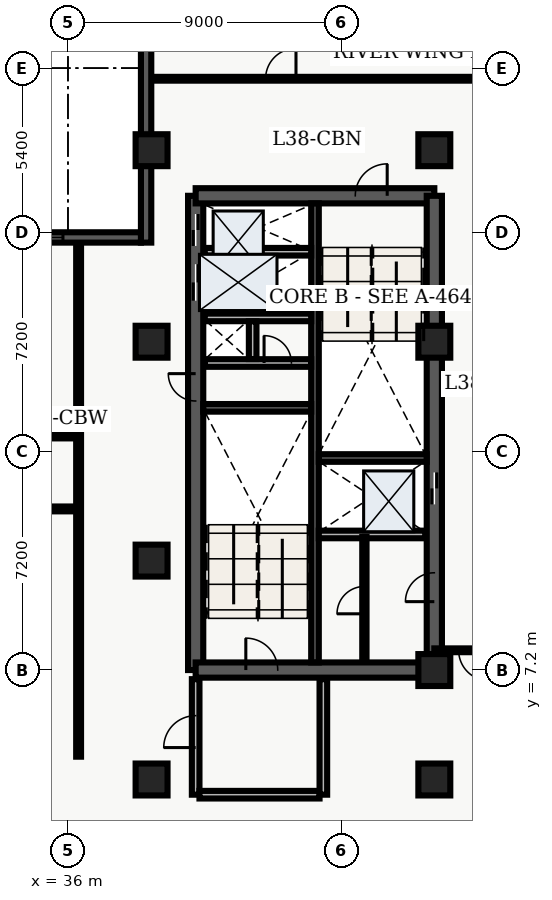
"""IFC4 building model, lengths in metres.
Left out: names, types, materials, properties, quantities, classifications, styles, units other than length and angle.
Written with IfcOpenShell. Run it as: python <this file> out.ifc"""

import sys

from ifc_helpers import new_model, entity, si_unit, converted_unit, direction, frame, origin_with_axes, origin_2d_with_axis, place, context, subcontext, project, spatial, polyline, rectangle, outline, extrude, element, fill, save


model = new_model("IFC4")
c1 = context("Model", 3, precision=1e-05, world=origin_with_axes(), true_north=direction((0.0, 1.0)))
c2 = subcontext(c1, "Body", "Model", "MODEL_VIEW")
j1 = project(units=[si_unit("LENGTHUNIT", "METRE"), converted_unit("PLANEANGLEUNIT", "DEGREE", entity("IfcPlaneAngleMeasure", 0.017), si_unit("PLANEANGLEUNIT", "RADIAN"), dimensions=[0, 0, 0, 0, 0, 0, 0])], contexts=[c1])
p1 = place(None, origin_with_axes())
s1 = spatial("IfcSite", under=j1, at=p1, CompositionType="ELEMENT")
p2 = place(p1, origin_with_axes())
s2 = spatial("IfcBuilding", under=s1, at=p2, CompositionType="ELEMENT")
p3 = place(p2, frame((0.0, 0.0, 156.3), z_axis=(0.0, 0.0, 1.0), x_axis=(1.0, 0.0, 0.0)))
s3 = spatial("IfcBuildingStorey", under=s2, at=p3, CompositionType="ELEMENT", Elevation=156.3)
p4 = place(p3, frame((40.2, 7.2, 0.0), z_axis=(0.0, 0.0, 1.0), x_axis=(0.0, 1.0, 0.0)))
e1 = element("IfcWall", 1, at=p4, inside=s3, PredefinedType="SHEAR", context=c2, shape_type="SweptSolid", body=[
    extrude(outline(polyline([(0.0, -0.25), (15.6, -0.25), (15.6, 0.25), (0.0, 0.25), (0.0, -0.25)])), origin_with_axes(), (0.0, 0.0, 1.0), 3.66),
])
p5 = place(p4, frame((14.475, 0.0, 0.0), z_axis=(0.0, 0.0, 1.0), x_axis=(1.0, 0.0, 0.0)))
e2 = element("IfcOpeningElement", 2, at=p5, cuts=e1, PredefinedType="OPENING", context=c2, shape_type="SweptSolid", body=[
    extrude(rectangle(XDim=1.05, YDim=0.52, at=origin_2d_with_axis()), origin_with_axes(), (0.0, 0.0, 1.0), 2.15),
])
p6 = place(p4, frame((12.75, 0.0, 0.0), z_axis=(0.0, 0.0, 1.0), x_axis=(1.0, 0.0, 0.0)))
e3 = element("IfcOpeningElement", 3, at=p6, cuts=e1, PredefinedType="OPENING", context=c2, shape_type="SweptSolid", body=[
    extrude(rectangle(XDim=1.2, YDim=0.52, at=origin_2d_with_axis()), origin_with_axes(), (0.0, 0.0, 1.0), 2.15),
])
p7 = place(p4, frame((9.3, 0.0, 0.0), z_axis=(0.0, 0.0, 1.0), x_axis=(1.0, 0.0, 0.0)))
e4 = element("IfcOpeningElement", 4, at=p7, cuts=e1, PredefinedType="OPENING", context=c2, shape_type="SweptSolid", body=[
    extrude(rectangle(XDim=0.9, YDim=0.52, at=origin_2d_with_axis()), origin_with_axes(), (0.0, 0.0, 1.0), 2.15),
])
p8 = place(p3, frame((40.2, 7.2, 0.0), z_axis=(0.0, 0.0, 1.0), x_axis=(1.0, 0.0, 0.0)))
e5 = element("IfcWall", 5, at=p8, inside=s3, PredefinedType="SHEAR", context=c2, shape_type="SweptSolid", body=[
    extrude(outline(polyline([(0.0, -0.25), (7.85, -0.25), (7.85, 0.25), (0.0, 0.25), (0.0, -0.25)])), origin_with_axes(), (0.0, 0.0, 1.0), 3.66),
])
p9 = place(p8, frame((2.175, 0.0, 0.0), z_axis=(0.0, 0.0, 1.0), x_axis=(1.0, 0.0, 0.0)))
e6 = element("IfcOpeningElement", 6, at=p9, cuts=e5, PredefinedType="OPENING", context=c2, shape_type="SweptSolid", body=[
    extrude(rectangle(XDim=1.05, YDim=0.52, at=origin_2d_with_axis()), origin_with_axes(), (0.0, 0.0, 1.0), 2.15),
])
p10 = place(p3, frame((40.2, 22.8, 0.0), z_axis=(0.0, 0.0, 1.0), x_axis=(1.0, 0.0, 0.0)))
e7 = element("IfcWall", 7, at=p10, inside=s3, PredefinedType="SHEAR", context=c2, shape_type="SweptSolid", body=[
    extrude(outline(polyline([(0.0, -0.25), (7.85, -0.25), (7.85, 0.25), (0.0, 0.25), (0.0, -0.25)])), origin_with_axes(), (0.0, 0.0, 1.0), 3.66),
])
p11 = place(p10, frame((5.775, 0.0, 0.0), z_axis=(0.0, 0.0, 1.0), x_axis=(1.0, 0.0, 0.0)))
e8 = element("IfcOpeningElement", 8, at=p11, cuts=e7, PredefinedType="OPENING", context=c2, shape_type="SweptSolid", body=[
    extrude(rectangle(XDim=1.05, YDim=0.52, at=origin_2d_with_axis()), origin_with_axes(), (0.0, 0.0, 1.0), 2.15),
])
p12 = place(p3, frame((48.05, 7.2, 0.0), z_axis=(0.0, 0.0, 1.0), x_axis=(0.0, 1.0, 0.0)))
e9 = element("IfcWall", 9, at=p12, inside=s3, PredefinedType="SHEAR", context=c2, shape_type="SweptSolid", body=[
    extrude(outline(polyline([(0.0, -0.25), (15.6, -0.25), (15.6, 0.25), (0.0, 0.25), (0.0, -0.25)])), origin_with_axes(), (0.0, 0.0, 1.0), 3.66),
])
p13 = place(p12, frame((5.975, 0.0, 0.0), z_axis=(0.0, 0.0, 1.0), x_axis=(1.0, 0.0, 0.0)))
e10 = element("IfcOpeningElement", 10, at=p13, cuts=e9, PredefinedType="OPENING", context=c2, shape_type="SweptSolid", body=[
    extrude(rectangle(XDim=1.05, YDim=0.52, at=origin_2d_with_axis()), origin_with_axes(), (0.0, 0.0, 1.0), 2.15),
])
p14 = place(p12, frame((2.725, 0.0, 0.0), z_axis=(0.0, 0.0, 1.0), x_axis=(1.0, 0.0, 0.0)))
e11 = element("IfcOpeningElement", 11, at=p14, cuts=e9, PredefinedType="OPENING", context=c2, shape_type="SweptSolid", body=[
    extrude(rectangle(XDim=0.95, YDim=0.52, at=origin_2d_with_axis()), origin_with_axes(), (0.0, 0.0, 1.0), 2.15),
])
p15 = place(p3, frame((44.125, 7.45, 0.0), z_axis=(0.0, 0.0, 1.0), x_axis=(0.0, 1.0, 0.0)))
e12 = element("IfcWall", 12, at=p15, inside=s3, PredefinedType="SHEAR", context=c2, shape_type="SweptSolid", body=[
    extrude(outline(polyline([(0.0, -0.125), (15.1, -0.125), (15.1, 0.125), (0.0, 0.125), (0.0, -0.125)])), origin_with_axes(), (0.0, 0.0, 1.0), 3.66),
])
for number, where, z_axis, x_axis in (
    (13, (40.45, 15.825, 0.0), (0.0, 0.0, 1.0), (1.0, 0.0, 0.0)),
    (14, (44.25, 14.175, 0.0), (0.0, 0.0, 1.0), (1.0, 0.0, 0.0)),
):
    element("IfcWall", number, at=place(p3, frame(where, z_axis=z_axis, x_axis=x_axis)), inside=s3, PredefinedType="SHEAR", context=c2, shape_type="SweptSolid", body=[
        extrude(outline(polyline([(0.0, -0.125), (3.55, -0.125), (3.55, 0.125), (0.0, 0.125), (0.0, -0.125)])), origin_with_axes(), (0.0, 0.0, 1.0), 3.66),
    ])
p16 = place(p3, frame((40.5, 17.3, 0.0), z_axis=(0.0, 0.0, 1.0), x_axis=(1.0, 0.0, 0.0)))
e15 = element("IfcWall", 15, at=p16, inside=s3, PredefinedType="SOLIDWALL", context=c2, shape_type="SweptSolid", body=[
    extrude(outline(polyline([(0.0, -0.125), (3.5, -0.125), (3.5, 0.125), (0.0, 0.125), (0.0, -0.125)])), origin_with_axes(), (0.0, 0.0, 1.0), 2.7),
])
p17 = place(p16, frame((2.4, 0.0, 0.0), z_axis=(0.0, 0.0, 1.0), x_axis=(1.0, 0.0, 0.0)))
e16 = element("IfcOpeningElement", 16, at=p17, cuts=e15, PredefinedType="OPENING", context=c2, shape_type="SweptSolid", body=[
    extrude(rectangle(XDim=0.9, YDim=0.27, at=origin_2d_with_axis()), origin_with_axes(), (0.0, 0.0, 1.0), 2.15),
])
p18 = place(p3, frame((40.5, 18.8, 0.0), z_axis=(0.0, 0.0, 1.0), x_axis=(1.0, 0.0, 0.0)))
e17 = element("IfcWall", 17, at=p18, inside=s3, PredefinedType="SOLIDWALL", context=c2, shape_type="SweptSolid", body=[
    extrude(outline(polyline([(0.0, -0.125), (3.5, -0.125), (3.5, 0.125), (0.0, 0.125), (0.0, -0.125)])), origin_with_axes(), (0.0, 0.0, 1.0), 2.7),
])
p19 = place(p3, frame((42.075, 17.43, 0.0), z_axis=(0.0, 0.0, 1.0), x_axis=(0.0, 1.0, 0.0)))
e18 = element("IfcWall", 18, at=p19, inside=s3, PredefinedType="SOLIDWALL", context=c2, shape_type="SweptSolid", body=[
    extrude(outline(polyline([(0.0, -0.125), (1.24, -0.125), (1.24, 0.125), (0.0, 0.125), (0.0, -0.125)])), origin_with_axes(), (0.0, 0.0, 1.0), 2.7),
])
p20 = place(p3, frame((40.2, 3.1, 0.0), z_axis=(0.0, 0.0, 1.0), x_axis=(0.0, 1.0, 0.0)))
e19 = element("IfcWall", 19, at=p20, inside=s3, PredefinedType="SOLIDWALL", context=c2, shape_type="SweptSolid", body=[
    extrude(outline(polyline([(0.0, -0.125), (3.8, -0.125), (3.8, 0.125), (0.0, 0.125), (0.0, -0.125)])), origin_with_axes(), (0.0, 0.0, 1.0), 2.7),
])
p21 = place(p20, frame((2.075, 0.0, 0.0), z_axis=(0.0, 0.0, 1.0), x_axis=(1.0, 0.0, 0.0)))
e20 = element("IfcOpeningElement", 20, at=p21, cuts=e19, PredefinedType="OPENING", context=c2, shape_type="SweptSolid", body=[
    extrude(rectangle(XDim=1.05, YDim=0.27, at=origin_2d_with_axis()), origin_with_axes(), (0.0, 0.0, 1.0), 2.15),
])
p22 = place(p3, frame((40.325, 3.1, 0.0), z_axis=(0.0, 0.0, 1.0), x_axis=(1.0, 0.0, 0.0)))
e21 = element("IfcWall", 21, at=p22, inside=s3, PredefinedType="SOLIDWALL", context=c2, shape_type="SweptSolid", body=[
    extrude(outline(polyline([(0.0, -0.125), (3.95, -0.125), (3.95, 0.125), (0.0, 0.125), (0.0, -0.125)])), origin_with_axes(), (0.0, 0.0, 1.0), 2.7),
])
p23 = place(p3, frame((44.4, 3.1, 0.0), z_axis=(0.0, 0.0, 1.0), x_axis=(0.0, 1.0, 0.0)))
e22 = element("IfcWall", 22, at=p23, inside=s3, PredefinedType="SOLIDWALL", context=c2, shape_type="SweptSolid", body=[
    extrude(outline(polyline([(0.0, -0.125), (3.8, -0.125), (3.8, 0.125), (0.0, 0.125), (0.0, -0.125)])), origin_with_axes(), (0.0, 0.0, 1.0), 2.7),
])
for number, where, z_axis, x_axis in (
    (23, (38.75, 3.6, 0.0), (0.0, 0.0, 1.0), (1.0, 0.0, 0.0)),
    (24, (38.75, 10.8, 0.0), (0.0, 0.0, 1.0), (1.0, 0.0, 0.0)),
    (25, (38.75, 18.0, 0.0), (0.0, 0.0, 1.0), (1.0, 0.0, 0.0)),
    (26, (38.75, 24.3, 0.0), (0.0, 0.0, 1.0), (1.0, 0.0, 0.0)),
    (27, (48.05, 3.6, 0.0), (0.0, 0.0, 1.0), (1.0, 0.0, 0.0)),
    (28, (48.05, 7.2, 0.0), (0.0, 0.0, 1.0), (1.0, 0.0, 0.0)),
    (29, (48.05, 18.0, 0.0), (0.0, 0.0, 1.0), (1.0, 0.0, 0.0)),
    (30, (48.05, 24.3, 0.0), (0.0, 0.0, 1.0), (1.0, 0.0, 0.0)),
):
    element("IfcColumn", number, at=place(p3, frame(where, z_axis=z_axis, x_axis=x_axis)), inside=s3, PredefinedType="COLUMN", context=c2, shape_type="SweptSolid", body=[
        extrude(rectangle(XDim=1.05, YDim=1.05, at=origin_2d_with_axis()), origin_with_axes(), (0.0, 0.0, 1.0), 3.9),
    ])
for number, where, z_axis, x_axis in (
    (31, (40.5, 20.96, 0.0), (0.0, 0.0, 1.0), (1.0, 0.0, 0.0)),
    (32, (44.25, 11.66, 0.0), (0.0, 0.0, 1.0), (1.0, 0.0, 0.0)),
):
    element("IfcWall", number, at=place(p3, frame(where, z_axis=z_axis, x_axis=x_axis)), inside=s3, PredefinedType="SOLIDWALL", context=c2, shape_type="SweptSolid", body=[
        extrude(outline(polyline([(0.0, -0.125), (3.5, -0.125), (3.5, 0.125), (0.0, 0.125), (0.0, -0.125)])), origin_with_axes(), (0.0, 0.0, 1.0), 2.7),
    ])
p24 = place(p3, frame((45.75, 7.5, 0.0), z_axis=(0.0, 0.0, 1.0), x_axis=(0.0, 1.0, 0.0)))
e33 = element("IfcWall", 33, at=p24, inside=s3, PredefinedType="PARTITIONING", context=c2, shape_type="SweptSolid", body=[
    extrude(outline(polyline([(0.0, -0.07), (4.08, -0.07), (4.08, 0.07), (0.0, 0.07), (0.0, -0.07)])), origin_with_axes(), (0.0, 0.0, 1.0), 2.7),
])
p25 = place(p24, frame((2.0, 0.0, 0.0), z_axis=(0.0, 0.0, 1.0), x_axis=(1.0, 0.0, 0.0)))
e34 = element("IfcOpeningElement", 34, at=p25, cuts=e33, PredefinedType="OPENING", context=c2, shape_type="SweptSolid", body=[
    extrude(rectangle(XDim=0.9, YDim=0.16, at=origin_2d_with_axis()), origin_with_axes(), (0.0, 0.0, 1.0), 2.15),
])
p26 = place(p3, frame((21.15, 12.5, 0.0), z_axis=(0.0, 0.0, 1.0), x_axis=(1.0, 0.0, 0.0)))
e35 = element("IfcWall", 35, at=p26, inside=s3, PredefinedType="PARTITIONING", context=c2, shape_type="SweptSolid", body=[
    extrude(outline(polyline([(0.0, -0.08), (15.2, -0.08), (15.2, 0.08), (0.0, 0.08), (0.0, -0.08)])), origin_with_axes(), (0.0, 0.0, 1.0), 2.7),
])
p27 = place(p26, frame((2.276, 0.0, 0.0), z_axis=(0.0, 0.0, 1.0), x_axis=(1.0, 0.0, 0.0)))
e36 = element("IfcOpeningElement", 36, at=p27, cuts=e35, PredefinedType="OPENING", context=c2, shape_type="SweptSolid", body=[
    extrude(rectangle(XDim=1.0, YDim=0.18, at=origin_2d_with_axis()), origin_with_axes(), (0.0, 0.0, 1.0), 2.15),
])
p28 = place(p26, frame((6.824, 0.0, 0.0), z_axis=(0.0, 0.0, 1.0), x_axis=(1.0, 0.0, 0.0)))
e37 = element("IfcOpeningElement", 37, at=p28, cuts=e35, PredefinedType="OPENING", context=c2, shape_type="SweptSolid", body=[
    extrude(rectangle(XDim=1.0, YDim=0.18, at=origin_2d_with_axis()), origin_with_axes(), (0.0, 0.0, 1.0), 2.15),
])
p29 = place(p26, frame((12.198, 0.0, 0.0), z_axis=(0.0, 0.0, 1.0), x_axis=(1.0, 0.0, 0.0)))
e38 = element("IfcOpeningElement", 38, at=p29, cuts=e35, PredefinedType="OPENING", context=c2, shape_type="SweptSolid", body=[
    extrude(rectangle(XDim=1.2, YDim=0.18, at=origin_2d_with_axis()), origin_with_axes(), (0.0, 0.0, 1.0), 2.2),
])
p30 = place(p3, frame((21.15, 14.9, 0.0), z_axis=(0.0, 0.0, 1.0), x_axis=(1.0, 0.0, 0.0)))
e39 = element("IfcWall", 39, at=p30, inside=s3, PredefinedType="PARTITIONING", context=c2, shape_type="SweptSolid", body=[
    extrude(outline(polyline([(0.0, -0.08), (15.2, -0.08), (15.2, 0.08), (0.0, 0.08), (0.0, -0.08)])), origin_with_axes(), (0.0, 0.0, 1.0), 2.7),
])
p31 = place(p30, frame((3.506, 0.0, 0.0), z_axis=(0.0, 0.0, 1.0), x_axis=(1.0, 0.0, 0.0)))
e40 = element("IfcOpeningElement", 40, at=p31, cuts=e39, PredefinedType="OPENING", context=c2, shape_type="SweptSolid", body=[
    extrude(rectangle(XDim=1.0, YDim=0.18, at=origin_2d_with_axis()), origin_with_axes(), (0.0, 0.0, 1.0), 2.15),
])
p32 = place(p30, frame((10.976, 0.0, 0.0), z_axis=(0.0, 0.0, 1.0), x_axis=(1.0, 0.0, 0.0)))
e41 = element("IfcOpeningElement", 41, at=p32, cuts=e39, PredefinedType="OPENING", context=c2, shape_type="SweptSolid", body=[
    extrude(rectangle(XDim=1.0, YDim=0.18, at=origin_2d_with_axis()), origin_with_axes(), (0.0, 0.0, 1.0), 2.15),
])
p33 = place(p3, frame((36.35, 4.35, 0.0), z_axis=(0.0, 0.0, 1.0), x_axis=(0.0, 1.0, 0.0)))
e42 = element("IfcWall", 42, at=p33, inside=s3, PredefinedType="PARTITIONING", context=c2, shape_type="SweptSolid", body=[
    extrude(outline(polyline([(0.0, -0.08), (16.95, -0.08), (16.95, 0.08), (0.0, 0.08), (0.0, -0.08)])), origin_with_axes(), (0.0, 0.0, 1.0), 2.7),
])
p34 = place(p3, frame((59.665, 7.85, 0.0), z_axis=(0.0, 0.0, 1.0), x_axis=(-1.0, 0.0, 0.0)))
e43 = element("IfcWall", 43, at=p34, inside=s3, PredefinedType="PARTITIONING", context=c2, shape_type="SweptSolid", body=[
    extrude(outline(polyline([(0.0, -0.062), (11.615, -0.062), (11.615, 0.062), (0.0, 0.062), (0.0, -0.062)])), origin_with_axes(), (0.0, 0.0, 1.0), 2.7),
])
p35 = place(p34, frame((10.315, 0.0, 0.0), z_axis=(0.0, 0.0, 1.0), x_axis=(1.0, 0.0, 0.0)))
e44 = element("IfcOpeningElement", 44, at=p35, cuts=e43, PredefinedType="OPENING", context=c2, shape_type="SweptSolid", body=[
    extrude(rectangle(XDim=1.0, YDim=0.145, at=origin_2d_with_axis()), origin_with_axes(), (0.0, 0.0, 1.0), 2.15),
])
p36 = place(p3, frame((38.735, 26.65, 0.0), z_axis=(0.0, 0.0, 1.0), x_axis=(1.0, 0.0, 0.0)))
e45 = element("IfcWall", 45, at=p36, inside=s3, PredefinedType="PARTITIONING", context=c2, shape_type="SweptSolid", body=[
    extrude(outline(polyline([(0.0, -0.062), (20.905, -0.062), (20.905, 0.062), (0.0, 0.062), (0.0, -0.062)])), origin_with_axes(), (0.0, 0.0, 1.0), 2.7),
])
p37 = place(p36, frame((4.265, 0.0, 0.0), z_axis=(0.0, 0.0, 1.0), x_axis=(1.0, 0.0, 0.0)))
e46 = element("IfcOpeningElement", 46, at=p37, cuts=e45, PredefinedType="OPENING", context=c2, shape_type="SweptSolid", body=[
    extrude(rectangle(XDim=1.0, YDim=0.145, at=origin_2d_with_axis()), origin_with_axes(), (0.0, 0.0, 1.0), 2.15),
])
p38 = place(p3, frame((38.57, 21.26, 0.0), z_axis=(0.0, 0.0, 1.0), x_axis=(0.0, 1.0, 0.0)))
e47 = element("IfcWall", 47, at=p38, inside=s3, PredefinedType="SOLIDWALL", context=c2, shape_type="SweptSolid", body=[
    extrude(outline(polyline([(0.0, -0.17), (7.54, -0.17), (7.54, 0.17), (0.0, 0.17), (0.0, -0.17)])), origin_with_axes(), (0.0, 0.0, 1.0), 3.66),
])
p39 = place(p3, frame((22.712, 21.43, 0.0), z_axis=(0.0, 0.0, 1.0), x_axis=(1.0, 0.0, 0.0)))
e48 = element("IfcWall", 48, at=p39, inside=s3, PredefinedType="SOLIDWALL", context=c2, shape_type="SweptSolid", body=[
    extrude(outline(polyline([(0.0, -0.17), (15.688, -0.17), (15.688, 0.17), (0.0, 0.17), (0.0, -0.17)])), origin_with_axes(), (0.0, 0.0, 1.0), 3.66),
])
p40 = place(p39, frame((3.015, 0.0, 0.45), z_axis=(0.0, 0.0, 1.0), x_axis=(1.0, 0.0, 0.0)))
e49 = element("IfcOpeningElement", 49, at=p40, cuts=e48, PredefinedType="OPENING", context=c2, shape_type="SweptSolid", body=[
    extrude(rectangle(XDim=1.8, YDim=0.36, at=origin_2d_with_axis()), origin_with_axes(), (0.0, 0.0, 1.0), 2.1),
])
p41 = place(p39, frame((7.844, 0.0, 0.45), z_axis=(0.0, 0.0, 1.0), x_axis=(1.0, 0.0, 0.0)))
e50 = element("IfcOpeningElement", 50, at=p41, cuts=e48, PredefinedType="OPENING", context=c2, shape_type="SweptSolid", body=[
    extrude(rectangle(XDim=1.8, YDim=0.36, at=origin_2d_with_axis()), origin_with_axes(), (0.0, 0.0, 1.0), 2.1),
])
p42 = place(p39, frame((12.223, 0.0, 0.45), z_axis=(0.0, 0.0, 1.0), x_axis=(1.0, 0.0, 0.0)))
e51 = element("IfcOpeningElement", 51, at=p42, cuts=e48, PredefinedType="OPENING", context=c2, shape_type="SweptSolid", body=[
    extrude(rectangle(XDim=1.8, YDim=0.36, at=origin_2d_with_axis()), origin_with_axes(), (0.0, 0.0, 1.0), 2.1),
])
p43 = place(p12, frame((5.975, 0.0, 0.0), z_axis=(0.0, 0.0, 1.0), x_axis=(1.0, 0.0, 0.0)))
e52 = element("IfcDoor", 52, at=p43, inside=s3, OperationType="SLIDING_TO_LEFT", PredefinedType="DOOR", context=c2, shape_type="SweptSolid", body=[
    extrude(rectangle(XDim=1.05, YDim=0.09, at=origin_2d_with_axis()), origin_with_axes(), (0.0, 0.0, 1.0), 2.15),
])
fill(e10, e52)
p44 = place(p4, frame((14.475, 0.0, 0.0), z_axis=(0.0, 0.0, 1.0), x_axis=(1.0, 0.0, 0.0)))
e53 = element("IfcDoor", 53, at=p44, inside=s3, OperationType="SLIDING_TO_RIGHT", PredefinedType="DOOR", context=c2, shape_type="SweptSolid", body=[
    extrude(rectangle(XDim=1.05, YDim=0.09, at=origin_2d_with_axis()), origin_with_axes(), (0.0, 0.0, 1.0), 2.15),
])
fill(e2, e53)
p45 = place(p4, frame((12.75, 0.0, 0.0), z_axis=(0.0, 0.0, 1.0), x_axis=(1.0, 0.0, 0.0)))
e54 = element("IfcDoor", 54, at=p45, inside=s3, OperationType="DOUBLE_DOOR_SLIDING", PredefinedType="DOOR", context=c2, shape_type="SweptSolid", body=[
    extrude(rectangle(XDim=1.2, YDim=0.09, at=origin_2d_with_axis()), origin_with_axes(), (0.0, 0.0, 1.0), 2.15),
])
fill(e3, e54)
p46 = place(p4, frame((9.3, 0.0, 0.0), z_axis=(0.0, 0.0, 1.0), x_axis=(1.0, 0.0, 0.0)))
e55 = element("IfcDoor", 55, at=p46, inside=s3, OperationType="SINGLE_SWING_RIGHT", PredefinedType="DOOR", context=c2, shape_type="SweptSolid", body=[
    extrude(rectangle(XDim=0.9, YDim=0.09, at=origin_2d_with_axis()), origin_with_axes(), (0.0, 0.0, 1.0), 2.15),
])
fill(e4, e55)
p47 = place(p16, frame((2.4, 0.0, 0.0), z_axis=(0.0, 0.0, 1.0), x_axis=(1.0, 0.0, 0.0)))
e56 = element("IfcDoor", 56, at=p47, inside=s3, OperationType="SINGLE_SWING_LEFT", PredefinedType="DOOR", context=c2, shape_type="SweptSolid", body=[
    extrude(rectangle(XDim=0.9, YDim=0.09, at=origin_2d_with_axis()), origin_with_axes(), (0.0, 0.0, 1.0), 2.15),
])
fill(e16, e56)
p48 = place(p8, frame((2.175, 0.0, 0.0), z_axis=(0.0, 0.0, 1.0), x_axis=(1.0, 0.0, 0.0)))
e57 = element("IfcDoor", 57, at=p48, inside=s3, OperationType="SINGLE_SWING_LEFT", PredefinedType="DOOR", context=c2, shape_type="SweptSolid", body=[
    extrude(rectangle(XDim=1.05, YDim=0.09, at=origin_2d_with_axis()), origin_with_axes(), (0.0, 0.0, 1.0), 2.15),
])
fill(e6, e57)
p49 = place(p10, frame((5.775, 0.0, 0.0), z_axis=(0.0, 0.0, 1.0), x_axis=(1.0, 0.0, 0.0)))
e58 = element("IfcDoor", 58, at=p49, inside=s3, OperationType="SINGLE_SWING_RIGHT", PredefinedType="DOOR", context=c2, shape_type="SweptSolid", body=[
    extrude(rectangle(XDim=1.05, YDim=0.09, at=origin_2d_with_axis()), origin_with_axes(), (0.0, 0.0, 1.0), 2.15),
])
fill(e8, e58)
p50 = place(p20, frame((2.075, 0.0, 0.0), z_axis=(0.0, 0.0, 1.0), x_axis=(1.0, 0.0, 0.0)))
e59 = element("IfcDoor", 59, at=p50, inside=s3, OperationType="SINGLE_SWING_LEFT", PredefinedType="DOOR", context=c2, shape_type="SweptSolid", body=[
    extrude(rectangle(XDim=1.05, YDim=0.09, at=origin_2d_with_axis()), origin_with_axes(), (0.0, 0.0, 1.0), 2.15),
])
fill(e20, e59)
p51 = place(p24, frame((2.0, 0.0, 0.0), z_axis=(0.0, 0.0, 1.0), x_axis=(1.0, 0.0, 0.0)))
e60 = element("IfcDoor", 60, at=p51, inside=s3, OperationType="SINGLE_SWING_LEFT", PredefinedType="DOOR", context=c2, shape_type="SweptSolid", body=[
    extrude(rectangle(XDim=0.9, YDim=0.084, at=origin_2d_with_axis()), origin_with_axes(), (0.0, 0.0, 1.0), 2.15),
])
fill(e34, e60)
p52 = place(p12, frame((2.725, 0.0, 0.0), z_axis=(0.0, 0.0, 1.0), x_axis=(1.0, 0.0, 0.0)))
e61 = element("IfcDoor", 61, at=p52, inside=s3, OperationType="SINGLE_SWING_LEFT", PredefinedType="DOOR", context=c2, shape_type="SweptSolid", body=[
    extrude(rectangle(XDim=0.95, YDim=0.09, at=origin_2d_with_axis()), origin_with_axes(), (0.0, 0.0, 1.0), 2.15),
])
fill(e11, e61)
p53 = place(p34, frame((10.315, 0.0, 0.0), z_axis=(0.0, 0.0, 1.0), x_axis=(1.0, 0.0, 0.0)))
e62 = element("IfcDoor", 62, at=p53, inside=s3, OperationType="SINGLE_SWING_LEFT", PredefinedType="DOOR", context=c2, shape_type="SweptSolid", body=[
    extrude(rectangle(XDim=1.0, YDim=0.075, at=origin_2d_with_axis()), origin_with_axes(), (0.0, 0.0, 1.0), 2.15),
])
fill(e44, e62)
p54 = place(p36, frame((4.265, 0.0, 0.0), z_axis=(0.0, 0.0, 1.0), x_axis=(1.0, 0.0, 0.0)))
e63 = element("IfcDoor", 63, at=p54, inside=s3, OperationType="SINGLE_SWING_RIGHT", PredefinedType="DOOR", context=c2, shape_type="SweptSolid", body=[
    extrude(rectangle(XDim=1.0, YDim=0.075, at=origin_2d_with_axis()), origin_with_axes(), (0.0, 0.0, 1.0), 2.15),
])
fill(e46, e63)
p55 = place(p39, frame((12.223, 0.0, 0.45), z_axis=(0.0, 0.0, 1.0), x_axis=(1.0, 0.0, 0.0)))
e64 = element("IfcWindow", 64, at=p55, inside=s3, PredefinedType="WINDOW", context=c2, shape_type="SweptSolid", body=[
    extrude(rectangle(XDim=1.8, YDim=0.09, at=origin_2d_with_axis()), origin_with_axes(), (0.0, 0.0, 1.0), 2.1),
])
fill(e51, e64)
save(model, sys.argv[1])
